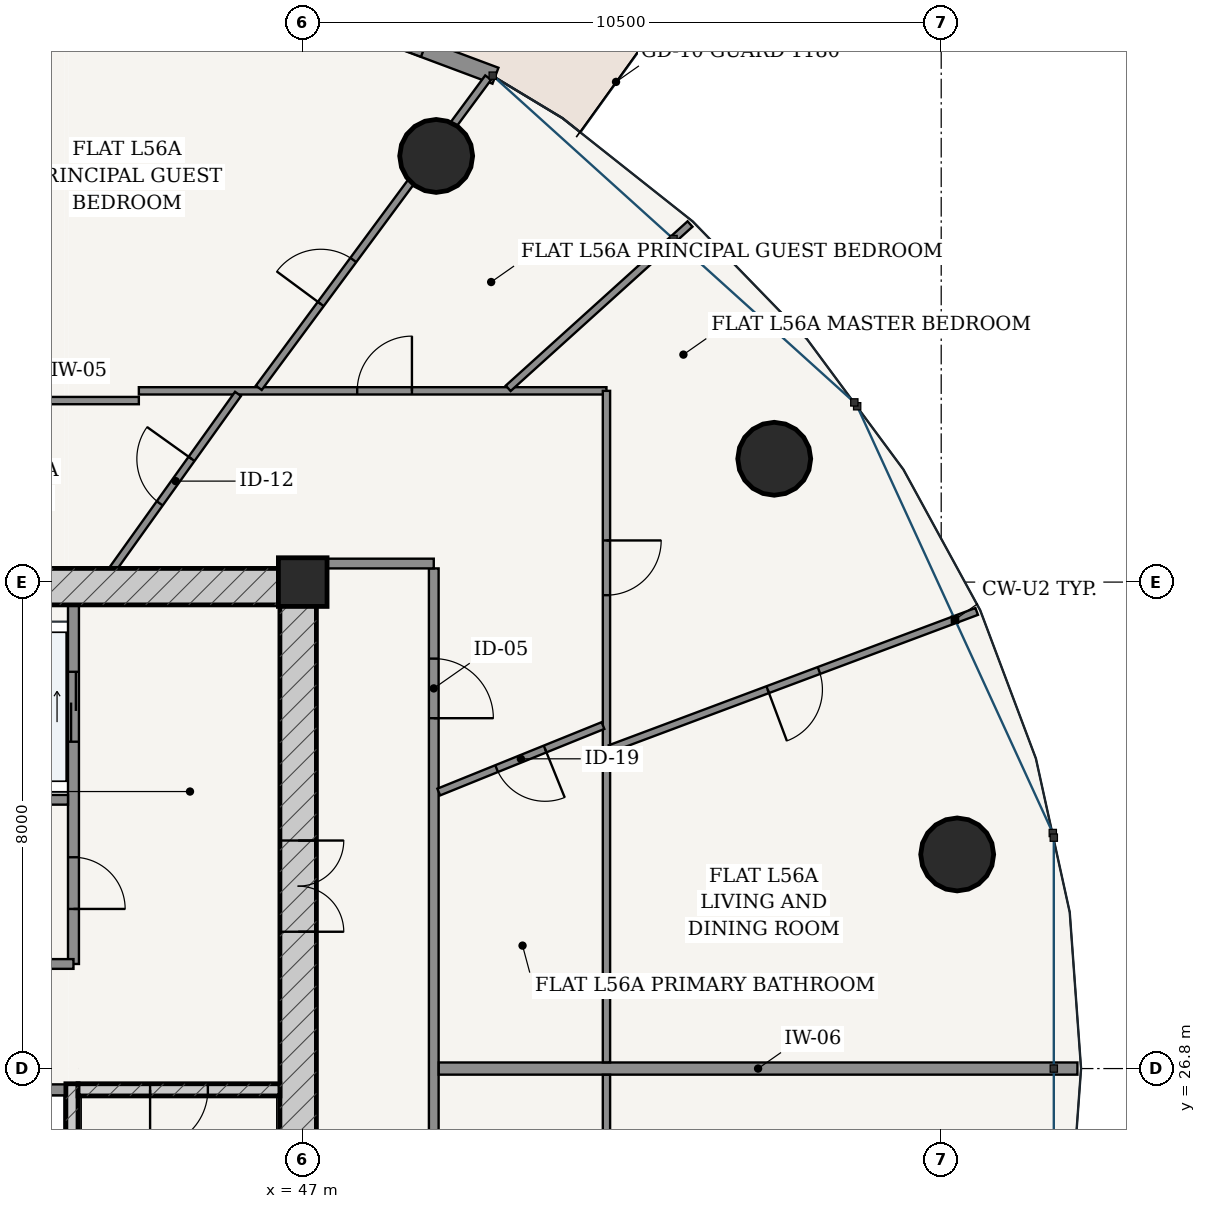
"""IFC4 building model, lengths in metres.
Left out: names, types, materials, properties, quantities, classifications, styles, units other than length and angle.
Written with IfcOpenShell. Run it as: python <this file> out.ifc"""

import sys

from ifc_helpers import new_model, si_unit, direction, frame, frame_2d, origin, origin_2d, place, context, subcontext, project, spatial, rectangle, hollow_circle, extrude, source, transform, mapped, element, fill, save


model = new_model("IFC4")
c1 = context("Model", 3, precision=1e-05, world=origin(), true_north=direction((-0.2419218956, 0.970295726276)))
c2 = subcontext(c1, "Body", "Model", "MODEL_VIEW")
j1 = project(units=[si_unit("LENGTHUNIT", "METRE"), si_unit("PLANEANGLEUNIT", "RADIAN")], contexts=[c1])
p1 = place(None, origin())
s1 = spatial("IfcSite", under=j1, at=p1, CompositionType="ELEMENT")
p2 = place(p1, origin())
s2 = spatial("IfcBuilding", under=s1, at=p2, CompositionType="ELEMENT")
p3 = place(p2, frame((0.0, 0.0, 213.4)))
s3 = spatial("IfcBuildingStorey", under=s2, at=p3, CompositionType="ELEMENT", Elevation=213.4)
p4 = place(p3, frame((47.0, 34.8, 0.0), z_axis=(0.0, 0.0, 1.0), x_axis=(1.0, 0.0, 0.0)))
e1 = element("IfcColumn", 1, at=p4, inside=s3, PredefinedType="COLUMN", context=c2, shape_type="SweptSolid", body=[
    extrude(rectangle(XDim=0.8, YDim=0.8, at=origin_2d()), origin(), (0.0, 0.0, 1.0), 3.7),
])
p5 = place(p3, frame((28.775, 34.725, 0.0), z_axis=(0.0, 0.0, 1.0), x_axis=(1.0, 0.0, 0.0)))
e2 = element("IfcWall", 2, at=p5, inside=s3, PredefinedType="SHEAR", context=c2, shape_type="SweptSolid", body=[
    extrude(rectangle(XDim=18.45, YDim=0.6, at=frame_2d((9.225, 0.0))), origin(), (0.0, 0.0, 1.0), 3.435),
])
p6 = place(p3, frame((46.925, 19.175, 0.0), z_axis=(0.0, 0.0, 1.0), x_axis=(0.0, 1.0, 0.0)))
e3 = element("IfcWall", 3, at=p6, inside=s3, PredefinedType="SHEAR", context=c2, shape_type="SweptSolid", body=[
    extrude(rectangle(XDim=15.25, YDim=0.6, at=frame_2d((7.625, 0.0))), origin(), (0.0, 0.0, 1.0), 3.435),
])
p7 = place(p6, frame((9.875, 0.0, 0.0)))
e4 = element("IfcOpeningElement", 4, at=p7, cuts=e3, PredefinedType="OPENING", context=c2, shape_type="SweptSolid", body=[
    extrude(rectangle(XDim=1.5, YDim=2.2, at=frame_2d((0.75, 1.1))), frame((0.0, 0.31, 0.0), z_axis=(0.0, -1.0, 0.0), x_axis=(1.0, 0.0, 0.0)), (0.0, 0.0, 1.0), 0.62),
])
p8 = place(p3, frame((43.205, 19.175, 0.0), z_axis=(0.0, 0.0, 1.0), x_axis=(0.0, 1.0, 0.0)))
e5 = element("IfcWall", 5, at=p8, inside=s3, PredefinedType="SOLIDWALL", context=c2, shape_type="SweptSolid", body=[
    extrude(rectangle(XDim=7.375, YDim=0.2, at=frame_2d((3.688, 0.0))), origin(), (0.0, 0.0, 1.0), 3.435),
])
p9 = place(p3, frame((43.305, 26.45, 0.0), z_axis=(0.0, 0.0, 1.0), x_axis=(1.0, 0.0, 0.0)))
e6 = element("IfcWall", 6, at=p9, inside=s3, PredefinedType="SOLIDWALL", context=c2, shape_type="SweptSolid", body=[
    extrude(rectangle(XDim=3.32, YDim=0.2, at=frame_2d((1.66, 0.0))), origin(), (0.0, 0.0, 1.0), 3.435),
])
p10 = place(p9, frame((1.185, 0.0, 0.0)))
e7 = element("IfcOpeningElement", 7, at=p10, cuts=e6, PredefinedType="OPENING", context=c2, shape_type="SweptSolid", body=[
    extrude(rectangle(XDim=0.95, YDim=2.15, at=frame_2d((0.475, 1.075))), frame((0.0, 0.11, 0.0), z_axis=(0.0, -1.0, 0.0), x_axis=(1.0, 0.0, 0.0)), (0.0, 0.0, 1.0), 0.22),
])
for number, where, z_axis, x_axis in (
    (8, (57.763, 30.321, 0.0), (0.0, 0.0, 1.0), (1.0, 0.0, 0.0)),
    (9, (54.754, 36.828, 0.0), (0.0, 0.0, 1.0), (1.0, 0.0, 0.0)),
    (10, (49.195, 41.808, 0.0), (0.0, 0.0, 1.0), (1.0, 0.0, 0.0)),
):
    element("IfcColumn", number, at=place(p3, frame(where, z_axis=z_axis, x_axis=x_axis)), inside=s3, PredefinedType="COLUMN", context=c2, shape_type="SweptSolid", body=[
        extrude(hollow_circle(Radius=0.6, WallThickness=0.038, at=origin_2d()), origin(), (0.0, 0.0, 1.0), 3.7),
    ])
p11 = place(p3, frame((50.17, 43.127, 0.0), z_axis=(0.0, 0.0, 1.0), x_axis=(-0.936556918375, 0.350515532672, 0.0)))
e11 = element("IfcWall", 11, at=p11, inside=s3, PredefinedType="SOLIDWALL", context=c2, shape_type="SweptSolid", body=[
    extrude(rectangle(XDim=8.539, YDim=0.28, at=frame_2d((4.27, 0.0))), origin(), (0.0, 0.0, 1.0), 3.435),
])
p12 = place(p11, frame((1.256, 0.0, 0.85)))
e12 = element("IfcOpeningElement", 12, at=p12, cuts=e11, PredefinedType="OPENING", context=c2, shape_type="SweptSolid", body=[
    extrude(rectangle(XDim=2.1, YDim=1.95, at=frame_2d((1.05, 0.975))), frame((0.0, 0.15, 0.0), z_axis=(0.0, -1.0, 0.0), x_axis=(1.0, 0.0, 0.0)), (0.0, 0.0, 1.0), 0.3),
])
p13 = place(p11, frame((5.184, 0.0, 0.85)))
e13 = element("IfcOpeningElement", 13, at=p13, cuts=e11, PredefinedType="OPENING", context=c2, shape_type="SweptSolid", body=[
    extrude(rectangle(XDim=2.1, YDim=1.95, at=frame_2d((1.05, 0.975))), frame((0.0, 0.15, 0.0), z_axis=(0.0, -1.0, 0.0), x_axis=(1.0, 0.0, 0.0)), (0.0, 0.0, 1.0), 0.3),
])
p14 = place(p3, frame((41.39, 26.45, 0.0), z_axis=(0.0, 0.0, 1.0), x_axis=(1.0, 0.0, 0.0)))
e14 = element("IfcWall", 14, at=p14, inside=s3, PredefinedType="PARTITIONING", context=c2, shape_type="SweptSolid", body=[
    extrude(rectangle(XDim=1.71, YDim=0.18, at=frame_2d((0.855, 0.0))), origin(), (0.0, 0.0, 1.0), 3.435),
])
p15 = place(p14, frame((0.43, 0.0, 0.0)))
e15 = element("IfcOpeningElement", 15, at=p15, cuts=e14, PredefinedType="OPENING", context=c2, shape_type="SweptSolid", body=[
    extrude(rectangle(XDim=0.85, YDim=2.1, at=frame_2d((0.425, 1.05))), frame((0.0, 0.1, 0.0), z_axis=(0.0, -1.0, 0.0), x_axis=(1.0, 0.0, 0.0)), (0.0, 0.0, 1.0), 0.2),
])
p16 = place(p3, frame((43.23, 28.52, 0.0), z_axis=(0.0, 0.0, 1.0), x_axis=(0.0, 1.0, 0.0)))
e16 = element("IfcWall", 16, at=p16, inside=s3, PredefinedType="PARTITIONING", context=c2, shape_type="SweptSolid", body=[
    extrude(rectangle(XDim=5.905, YDim=0.18, at=frame_2d((2.953, 0.0))), origin(), (0.0, 0.0, 1.0), 3.435),
])
p17 = place(p16, frame((0.905, 0.0, 0.0)))
e17 = element("IfcOpeningElement", 17, at=p17, cuts=e16, PredefinedType="OPENING", context=c2, shape_type="SweptSolid", body=[
    extrude(rectangle(XDim=0.85, YDim=2.1, at=frame_2d((0.425, 1.05))), frame((0.0, 0.1, 0.0), z_axis=(0.0, -1.0, 0.0), x_axis=(1.0, 0.0, 0.0)), (0.0, 0.0, 1.0), 0.2),
])
p18 = place(p16, frame((3.655, 0.0, 0.0)))
e18 = element("IfcOpeningElement", 18, at=p18, cuts=e16, PredefinedType="OPENING", context=c2, shape_type="SweptSolid", body=[
    extrude(rectangle(XDim=1.15, YDim=2.2, at=frame_2d((0.575, 1.1))), frame((0.0, 0.1, 0.0), z_axis=(0.0, -1.0, 0.0), x_axis=(1.0, 0.0, 0.0)), (0.0, 0.0, 1.0), 0.2),
])
p19 = place(p3, frame((41.39, 31.22, 0.0), z_axis=(0.0, 0.0, 1.0), x_axis=(1.0, 0.0, 0.0)))
e19 = element("IfcWall", 19, at=p19, inside=s3, PredefinedType="PARTITIONING", context=c2, shape_type="SweptSolid", body=[
    extrude(rectangle(XDim=1.75, YDim=0.16, at=frame_2d((0.875, 0.0))), origin(), (0.0, 0.0, 1.0), 3.435),
])
p20 = place(p3, frame((41.39, 28.52, 0.0), z_axis=(0.0, 0.0, 1.0), x_axis=(1.0, 0.0, 0.0)))
e20 = element("IfcWall", 20, at=p20, inside=s3, PredefinedType="PARTITIONING", context=c2, shape_type="SweptSolid", body=[
    extrude(rectangle(XDim=1.84, YDim=0.16, at=frame_2d((0.92, 0.0))), origin(), (0.0, 0.0, 1.0), 3.435),
])
p21 = place(p3, frame((49.155, 16.725, 0.0), z_axis=(0.0, 0.0, 1.0), x_axis=(0.0, 1.0, 0.0)))
e21 = element("IfcWall", 21, at=p21, inside=s3, PredefinedType="PARTITIONING", context=c2, shape_type="SweptSolid", body=[
    extrude(rectangle(XDim=18.3, YDim=0.16, at=frame_2d((9.15, 0.0))), origin(), (0.0, 0.0, 1.0), 2.951),
])
p22 = place(p21, frame((15.837, 0.0, 0.0)))
e22 = element("IfcOpeningElement", 22, at=p22, cuts=e21, PredefinedType="OPENING", context=c2, shape_type="SweptSolid", body=[
    extrude(rectangle(XDim=0.98, YDim=2.2, at=frame_2d((0.49, 1.1))), frame((0.0, 0.09, 0.0), z_axis=(0.0, -1.0, 0.0), x_axis=(1.0, 0.0, 0.0)), (0.0, 0.0, 1.0), 0.18),
])
p23 = place(p3, frame((47.225, 35.105, 0.0), z_axis=(0.0, 0.0, 1.0), x_axis=(1.0, 0.0, 0.0)))
e23 = element("IfcWall", 23, at=p23, inside=s3, PredefinedType="PARTITIONING", context=c2, shape_type="SweptSolid", body=[
    extrude(rectangle(XDim=1.93, YDim=0.16, at=frame_2d((0.965, 0.0))), origin(), (0.0, 0.0, 1.0), 3.435),
])
p24 = place(p3, frame((49.237, 26.8, 0.0), z_axis=(0.0, 0.0, 1.0), x_axis=(1.0, 0.0, 0.0)))
e24 = element("IfcWall", 24, at=p24, inside=s3, PredefinedType="PARTITIONING", context=c2, shape_type="SweptSolid", body=[
    extrude(rectangle(XDim=10.503, YDim=0.2, at=frame_2d((5.251, 0.0))), origin(), (0.0, 0.0, 1.0), 2.951),
])
p25 = place(p3, frame((40.52, 37.785, 0.0), z_axis=(0.0, 0.0, 1.0), x_axis=(1.0, 0.0, 0.0)))
e25 = element("IfcWall", 25, at=p25, inside=s3, PredefinedType="PARTITIONING", context=c2, shape_type="SweptSolid", body=[
    extrude(rectangle(XDim=3.785, YDim=0.12, at=frame_2d((1.893, 0.0))), origin(), (0.0, 0.0, 1.0), 2.951),
])
p26 = place(p3, frame((44.305, 37.945, 0.0), z_axis=(0.0, 0.0, 1.0), x_axis=(1.0, 0.0, 0.0)))
e26 = element("IfcWall", 26, at=p26, inside=s3, PredefinedType="PARTITIONING", context=c2, shape_type="SweptSolid", body=[
    extrude(rectangle(XDim=7.69, YDim=0.12, at=frame_2d((3.845, 0.0))), origin(), (0.0, 0.0, 1.0), 2.951),
])
p27 = place(p26, frame((3.591, 0.0, 0.0)))
e27 = element("IfcOpeningElement", 27, at=p27, cuts=e26, PredefinedType="OPENING", context=c2, shape_type="SweptSolid", body=[
    extrude(rectangle(XDim=0.9, YDim=2.15, at=frame_2d((0.45, 1.075))), frame((0.0, 0.07, 0.0), z_axis=(0.0, -1.0, 0.0), x_axis=(1.0, 0.0, 0.0)), (0.0, 0.0, 1.0), 0.14),
])
p28 = place(p3, frame((51.995, 37.945, 0.0), z_axis=(0.0, 0.0, 1.0), x_axis=(0.0, -1.0, 0.0)))
e28 = element("IfcWall", 28, at=p28, inside=s3, PredefinedType="PARTITIONING", context=c2, shape_type="SweptSolid", body=[
    extrude(rectangle(XDim=11.043, YDim=0.12, at=frame_2d((5.521, 0.0))), origin(), (0.0, 0.0, 1.0), 2.951),
])
p29 = place(p28, frame((2.46, 0.0, 0.0)))
e29 = element("IfcOpeningElement", 29, at=p29, cuts=e28, PredefinedType="OPENING", context=c2, shape_type="SweptSolid", body=[
    extrude(rectangle(XDim=0.9, YDim=2.15, at=frame_2d((0.45, 1.075))), frame((0.0, 0.07, 0.0), z_axis=(0.0, -1.0, 0.0), x_axis=(1.0, 0.0, 0.0)), (0.0, 0.0, 1.0), 0.14),
])
p30 = place(p3, frame((52.053, 32.06, 0.0), z_axis=(0.0, 0.0, 1.0), x_axis=(0.936547148815, 0.350541635255, 0.0)))
e30 = element("IfcWall", 30, at=p30, inside=s3, PredefinedType="PARTITIONING", context=c2, shape_type="SweptSolid", body=[
    extrude(rectangle(XDim=6.439, YDim=0.12, at=frame_2d((3.219, 0.0))), origin(), (0.0, 0.0, 1.0), 2.951),
])
p31 = place(p30, frame((2.769, 0.0, 0.0)))
e31 = element("IfcOpeningElement", 31, at=p31, cuts=e30, PredefinedType="OPENING", context=c2, shape_type="SweptSolid", body=[
    extrude(rectangle(XDim=0.9, YDim=2.15, at=frame_2d((0.45, 1.075))), frame((0.0, 0.07, 0.0), z_axis=(0.0, -1.0, 0.0), x_axis=(1.0, 0.0, 0.0)), (0.0, 0.0, 1.0), 0.14),
])
p32 = place(p3, frame((50.379, 37.987, 0.0), z_axis=(0.0, 0.0, 1.0), x_axis=(0.741946116474, 0.67045951425, 0.0)))
e32 = element("IfcWall", 32, at=p32, inside=s3, PredefinedType="PARTITIONING", context=c2, shape_type="SweptSolid", body=[
    extrude(rectangle(XDim=4.03, YDim=0.12, at=frame_2d((2.015, 0.0))), origin(), (0.0, 0.0, 1.0), 2.951),
])
p33 = place(p3, frame((46.278, 37.995, 0.0), z_axis=(0.0, 0.0, 1.0), x_axis=(0.594518724985, 0.80408176552, 0.0)))
e33 = element("IfcWall", 33, at=p33, inside=s3, PredefinedType="PARTITIONING", context=c2, shape_type="SweptSolid", body=[
    extrude(rectangle(XDim=6.344, YDim=0.12, at=frame_2d((3.172, 0.0))), origin(), (0.0, 0.0, 1.0), 2.951),
])
p34 = place(p33, frame((1.715, 0.0, 0.0)))
e34 = element("IfcOpeningElement", 34, at=p34, cuts=e33, PredefinedType="OPENING", context=c2, shape_type="SweptSolid", body=[
    extrude(rectangle(XDim=0.9, YDim=2.15, at=frame_2d((0.45, 1.075))), frame((0.0, 0.07, 0.0), z_axis=(0.0, -1.0, 0.0), x_axis=(1.0, 0.0, 0.0)), (0.0, 0.0, 1.0), 0.14),
])
p35 = place(p3, frame((49.237, 31.347, 0.0), z_axis=(0.0, 0.0, 1.0), x_axis=(0.926960690293, 0.375158471383, 0.0)))
e35 = element("IfcWall", 35, at=p35, inside=s3, PredefinedType="PARTITIONING", context=c2, shape_type="SweptSolid", body=[
    extrude(rectangle(XDim=2.914, YDim=0.12, at=frame_2d((1.457, 0.0))), origin(), (0.0, 0.0, 1.0), 3.11),
])
p36 = place(p35, frame((1.027, 0.0, 0.0)))
e36 = element("IfcOpeningElement", 36, at=p36, cuts=e35, PredefinedType="OPENING", context=c2, shape_type="SweptSolid", body=[
    extrude(rectangle(XDim=0.86, YDim=2.15, at=frame_2d((0.43, 1.075))), frame((0.0, 0.07, 0.0), z_axis=(0.0, -1.0, 0.0), x_axis=(1.0, 0.0, 0.0)), (0.0, 0.0, 1.0), 0.14),
])
p37 = place(p3, frame((43.885, 35.027, 0.0), z_axis=(0.0, 0.0, 1.0), x_axis=(0.581801309538, 0.813330951225, 0.0)))
e37 = element("IfcWall", 37, at=p37, inside=s3, PredefinedType="PARTITIONING", context=c2, shape_type="SweptSolid", body=[
    extrude(rectangle(XDim=3.526, YDim=0.12, at=frame_2d((1.763, 0.0))), origin(), (0.0, 0.0, 1.0), 3.435),
])
p38 = place(p37, frame((1.313, 0.0, 0.0)))
e38 = element("IfcOpeningElement", 38, at=p38, cuts=e37, PredefinedType="OPENING", context=c2, shape_type="SweptSolid", body=[
    extrude(rectangle(XDim=0.9, YDim=2.15, at=frame_2d((0.45, 1.075))), frame((0.0, 0.07, 0.0), z_axis=(0.0, -1.0, 0.0), x_axis=(1.0, 0.0, 0.0)), (0.0, 0.0, 1.0), 0.14),
])
p39 = place(p3, frame((51.995, 26.698, 0.0), z_axis=(0.0, 0.0, 1.0), x_axis=(0.0, -1.0, 0.0)))
e39 = element("IfcWall", 39, at=p39, inside=s3, PredefinedType="PARTITIONING", context=c2, shape_type="SweptSolid", body=[
    extrude(rectangle(XDim=12.893, YDim=0.12, at=frame_2d((6.447, 0.0))), origin(), (0.0, 0.0, 1.0), 2.951),
])
p40 = place(p39, frame((10.051, 0.0, 0.0)))
e40 = element("IfcOpeningElement", 40, at=p40, cuts=e39, PredefinedType="OPENING", context=c2, shape_type="SweptSolid", body=[
    extrude(rectangle(XDim=0.9, YDim=2.15, at=frame_2d((0.45, 1.075))), frame((0.0, 0.07, 0.0), z_axis=(0.0, -1.0, 0.0), x_axis=(1.0, 0.0, 0.0)), (0.0, 0.0, 1.0), 0.14),
])
p41 = place(p39, frame((5.873, 0.0, 0.0)))
e41 = element("IfcOpeningElement", 41, at=p41, cuts=e39, PredefinedType="OPENING", context=c2, shape_type="SweptSolid", body=[
    extrude(rectangle(XDim=0.9, YDim=2.15, at=frame_2d((0.45, 1.075))), frame((0.0, 0.07, 0.0), z_axis=(0.0, -1.0, 0.0), x_axis=(1.0, 0.0, 0.0)), (0.0, 0.0, 1.0), 0.14),
])
m1 = source(origin(), c2, "Body", "SweptSolid", [
    extrude(rectangle(XDim=1.5, YDim=2.2, at=frame_2d((0.75, 1.1))), frame((0.0, 0.025, 0.0), z_axis=(0.0, -1.0, 0.0), x_axis=(1.0, 0.0, 0.0)), (0.0, 0.0, 1.0), 0.05),
])
p42 = place(p7, frame((1.5, 0.0, 0.0), z_axis=(0.0, 0.0, 1.0), x_axis=(-1.0, 0.0, 0.0)))
e42 = element("IfcDoor", 42, at=p42, inside=s3, OperationType="DOUBLE_DOOR_SINGLE_SWING", PredefinedType="DOOR", context=c2, shape_type="MappedRepresentation", body=[
    mapped(m1, transform((0.0, 0.0, 0.0), scale=1.0)),
])
fill(e4, e42)
m2 = source(origin(), c2, "Body", "SweptSolid", [
    extrude(rectangle(XDim=0.95, YDim=2.15, at=frame_2d((0.475, 1.075))), frame((0.0, 0.025, 0.0), z_axis=(0.0, -1.0, 0.0), x_axis=(1.0, 0.0, 0.0)), (0.0, 0.0, 1.0), 0.05),
])
p43 = place(p10, frame((0.95, 0.0, 0.0), z_axis=(0.0, 0.0, 1.0), x_axis=(-1.0, 0.0, 0.0)))
e43 = element("IfcDoor", 43, at=p43, inside=s3, OperationType="SINGLE_SWING_RIGHT", PredefinedType="DOOR", context=c2, shape_type="MappedRepresentation", body=[
    mapped(m2, transform((0.0, 0.0, 0.0), scale=1.0)),
])
fill(e7, e43)
m3 = source(origin(), c2, "Body", "SweptSolid", [
    extrude(rectangle(XDim=0.85, YDim=2.1, at=frame_2d((0.425, 1.05))), frame((0.0, 0.025, 0.0), z_axis=(0.0, -1.0, 0.0), x_axis=(1.0, 0.0, 0.0)), (0.0, 0.0, 1.0), 0.05),
])
p44 = place(p17, frame((0.85, 0.0, 0.0), z_axis=(0.0, 0.0, 1.0), x_axis=(-1.0, 0.0, 0.0)))
e44 = element("IfcDoor", 44, at=p44, inside=s3, OperationType="SINGLE_SWING_RIGHT", PredefinedType="DOOR", context=c2, shape_type="MappedRepresentation", body=[
    mapped(m3, transform((0.0, 0.0, 0.0), scale=1.0)),
])
fill(e17, e44)
m4 = source(origin(), c2, "Body", "SweptSolid", [
    extrude(rectangle(XDim=1.15, YDim=2.2, at=frame_2d((0.575, 1.1))), frame((0.0, 0.025, 0.0), z_axis=(0.0, -1.0, 0.0), x_axis=(1.0, 0.0, 0.0)), (0.0, 0.0, 1.0), 0.05),
])
p45 = place(p18, origin())
e45 = element("IfcDoor", 45, at=p45, inside=s3, OperationType="DOUBLE_DOOR_SLIDING", PredefinedType="DOOR", context=c2, shape_type="MappedRepresentation", body=[
    mapped(m4, transform((0.0, 0.0, 0.0), scale=1.0)),
])
fill(e18, e45)
m5 = source(origin(), c2, "Body", "SweptSolid", [
    extrude(rectangle(XDim=0.98, YDim=2.2, at=frame_2d((0.49, 1.1))), frame((0.0, 0.025, 0.0), z_axis=(0.0, -1.0, 0.0), x_axis=(1.0, 0.0, 0.0)), (0.0, 0.0, 1.0), 0.05),
])
p46 = place(p22, frame((0.98, 0.0, 0.0), z_axis=(0.0, 0.0, 1.0), x_axis=(-1.0, 0.0, 0.0)))
e46 = element("IfcDoor", 46, at=p46, inside=s3, OperationType="SINGLE_SWING_RIGHT", PredefinedType="DOOR", context=c2, shape_type="MappedRepresentation", body=[
    mapped(m5, transform((0.0, 0.0, 0.0), scale=1.0)),
])
fill(e22, e46)
m6 = source(origin(), c2, "Body", "SweptSolid", [
    extrude(rectangle(XDim=0.86, YDim=2.15, at=frame_2d((0.43, 1.075))), frame((0.0, 0.025, 0.0), z_axis=(0.0, -1.0, 0.0), x_axis=(1.0, 0.0, 0.0)), (0.0, 0.0, 1.0), 0.05),
])
p47 = place(p36, frame((0.86, 0.0, 0.0), z_axis=(0.0, 0.0, 1.0), x_axis=(-1.0, 0.0, 0.0)))
e47 = element("IfcDoor", 47, at=p47, inside=s3, OperationType="SINGLE_SWING_LEFT", PredefinedType="DOOR", context=c2, shape_type="MappedRepresentation", body=[
    mapped(m6, transform((0.0, 0.0, 0.0), scale=1.0)),
])
fill(e36, e47)
m7 = source(origin(), c2, "Body", "SweptSolid", [
    extrude(rectangle(XDim=0.9, YDim=2.15, at=frame_2d((0.45, 1.075))), frame((0.0, 0.025, 0.0), z_axis=(0.0, -1.0, 0.0), x_axis=(1.0, 0.0, 0.0)), (0.0, 0.0, 1.0), 0.05),
])
p48 = place(p38, origin())
e48 = element("IfcDoor", 48, at=p48, inside=s3, OperationType="SINGLE_SWING_RIGHT", PredefinedType="DOOR", context=c2, shape_type="MappedRepresentation", body=[
    mapped(m7, transform((0.0, 0.0, 0.0), scale=1.0)),
])
fill(e38, e48)
p49 = place(p29, origin())
e49 = element("IfcDoor", 49, at=p49, inside=s3, OperationType="SINGLE_SWING_LEFT", PredefinedType="DOOR", context=c2, shape_type="MappedRepresentation", body=[
    mapped(m7, transform((0.0, 0.0, 0.0), scale=1.0)),
])
fill(e29, e49)
p50 = place(p27, origin())
e50 = element("IfcDoor", 50, at=p50, inside=s3, OperationType="SINGLE_SWING_RIGHT", PredefinedType="DOOR", context=c2, shape_type="MappedRepresentation", body=[
    mapped(m7, transform((0.0, 0.0, 0.0), scale=1.0)),
])
fill(e27, e50)
p51 = place(p34, origin())
e51 = element("IfcDoor", 51, at=p51, inside=s3, OperationType="SINGLE_SWING_LEFT", PredefinedType="DOOR", context=c2, shape_type="MappedRepresentation", body=[
    mapped(m7, transform((0.0, 0.0, 0.0), scale=1.0)),
])
fill(e34, e51)
p52 = place(p31, frame((0.9, 0.0, 0.0), z_axis=(0.0, 0.0, 1.0), x_axis=(-1.0, 0.0, 0.0)))
e52 = element("IfcDoor", 52, at=p52, inside=s3, OperationType="SINGLE_SWING_RIGHT", PredefinedType="DOOR", context=c2, shape_type="MappedRepresentation", body=[
    mapped(m7, transform((0.0, 0.0, 0.0), scale=1.0)),
])
fill(e31, e52)
save(model, sys.argv[1])
